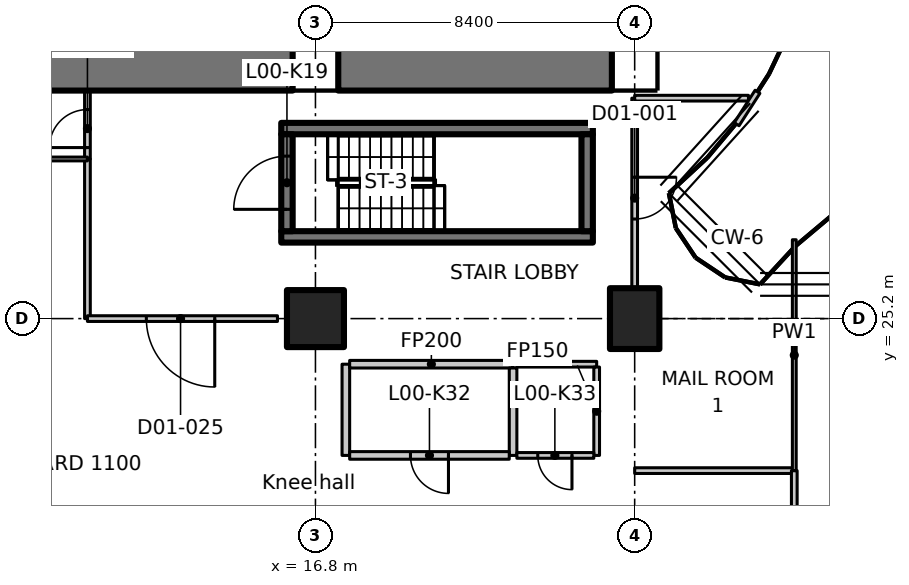
"""IFC4 building model, lengths in metres.
Left out: names, types, materials, properties, quantities, classifications, styles, units other than length and angle.
Written with IfcOpenShell. Run it as: python <this file> out.ifc"""

import sys

from ifc_helpers import new_model, si_unit, direction, frame, frame_2d, origin, origin_2d, place, context, subcontext, project, spatial, polyline, rectangle, outline, extrude, element, fill, save


model = new_model("IFC4")
c1 = context("Model", 3, precision=1e-05, world=origin(), true_north=direction((0.0, 1.0)))
c2 = subcontext(c1, "Body", "Model", "MODEL_VIEW")
j1 = project(units=[si_unit("LENGTHUNIT", "METRE"), si_unit("PLANEANGLEUNIT", "RADIAN")], contexts=[c1])
p1 = place(None, origin())
s1 = spatial("IfcSite", under=j1, at=p1, CompositionType="ELEMENT")
p2 = place(p1, origin())
s2 = spatial("IfcBuilding", under=s1, at=p2, CompositionType="ELEMENT")
p3 = place(p2, origin())
s3 = spatial("IfcBuildingStorey", under=s2, at=p3, CompositionType="ELEMENT", Elevation=0.0)
p4 = place(p3, frame((16.8, 25.2, 0.0), z_axis=(0.0, 0.0, 1.0), x_axis=(1.0, 0.0, 0.0)))
e1 = element("IfcColumn", 1, at=p4, inside=s3, PredefinedType="COLUMN", context=c2, shape_type="SweptSolid", body=[
    extrude(rectangle(XDim=1.5, YDim=1.5, at=origin_2d()), origin(), (0.0, 0.0, 1.0), 6.75),
])
p5 = place(p3, frame((25.2, 25.2, 0.0), z_axis=(0.0, 0.0, 1.0), x_axis=(1.0, 0.0, 0.0)))
e2 = element("IfcColumn", 2, at=p5, inside=s3, PredefinedType="COLUMN", context=c2, shape_type="SweptSolid", body=[
    extrude(rectangle(XDim=1.3, YDim=1.6, at=origin_2d()), origin(), (0.0, 0.0, 1.0), 6.75),
])
for number, where, z_axis, x_axis in (
    (3, (16.2, 42.0, 0.0), (1.0, 0.0, 0.0), (0.0, 1.0, 0.0)),
    (4, (24.6, 42.0, 0.0), (1.0, 0.0, 0.0), (0.0, 1.0, 0.0)),
):
    element("IfcWall", number, at=place(p3, frame(where, z_axis=z_axis, x_axis=x_axis)), inside=s3, PredefinedType="SOLIDWALL", context=c2, shape_type="SweptSolid", body=[
        extrude(outline(polyline([(-10.8, -6.3), (10.8, -6.3), (10.8, 36.25), (-10.8, 36.25), (-10.8, -6.3)]), holes=[polyline([(-8.4, 0.0), (-8.4, 26.6), (-8.36, 27.423), (-8.239, 28.239), (-8.038, 29.038), (-7.76, 29.814), (-7.408, 30.56), (-6.984, 31.267), (-6.493, 31.929), (-5.94, 32.54), (-5.329, 33.093), (-4.667, 33.584), (-3.96, 34.008), (-3.215, 34.361), (-2.438, 34.638), (-1.639, 34.839), (-0.823, 34.959), (0.0, 35.0), (0.823, 34.959), (1.639, 34.839), (2.438, 34.638), (3.215, 34.361), (3.96, 34.008), (4.667, 33.584), (5.329, 33.093), (5.94, 32.54), (6.493, 31.929), (6.984, 31.267), (7.408, 30.56), (7.76, 29.814), (8.038, 29.038), (8.239, 28.239), (8.36, 27.423), (8.4, 26.6), (8.4, 0.0), (-8.4, 0.0)])]), origin(), (0.0, 0.0, 1.0), 1.2),
    ])
p6 = place(p3, frame((9.0, 32.4, -6.3), z_axis=(0.0, 0.0, 1.0), x_axis=(1.0, 0.0, 0.0)))
e5 = element("IfcWall", 5, at=p6, inside=s3, PredefinedType="SOLIDWALL", context=c2, shape_type="SweptSolid", body=[
    extrude(rectangle(XDim=7.2, YDim=2.4, at=frame_2d((3.6, 0.0))), origin(), (0.0, 0.0, 1.0), 42.55),
])
p7 = place(p3, frame((17.4, 32.4, -6.3), z_axis=(0.0, 0.0, 1.0), x_axis=(1.0, 0.0, 0.0)))
e6 = element("IfcWall", 6, at=p7, inside=s3, PredefinedType="SOLIDWALL", context=c2, shape_type="SweptSolid", body=[
    extrude(rectangle(XDim=7.2, YDim=2.4, at=frame_2d((3.6, 0.0))), origin(), (0.0, 0.0, 1.0), 42.55),
])
p8 = place(p3, frame((25.8, 42.0, 0.0), z_axis=(1.0, 0.0, 0.0), x_axis=(0.0, 1.0, 0.0)))
e7 = element("IfcWall", 7, at=p8, inside=s3, PredefinedType="SOLIDWALL", context=c2, shape_type="SweptSolid", body=[
    extrude(outline(polyline([(5.4, 35.953), (6.0, 35.58), (6.575, 35.168), (7.121, 34.72), (7.637, 34.237), (8.12, 33.721), (8.568, 33.175), (8.98, 32.6), (9.353, 32.0), (9.686, 31.377), (9.978, 30.733), (10.227, 30.072), (10.432, 29.395), (10.593, 28.707), (10.708, 28.01), (10.777, 27.306), (10.8, 26.6), (10.8, 0.0), (8.4, 0.0), (8.4, 26.6), (8.382, 27.149), (8.328, 27.696), (8.239, 28.239), (8.114, 28.774), (7.954, 29.3), (7.76, 29.814), (7.534, 30.315), (7.275, 30.8), (6.984, 31.267), (6.664, 31.714), (6.315, 32.138), (5.94, 32.54), (5.539, 32.915), (5.114, 33.264), (4.667, 33.584), (4.2, 33.875), (3.715, 34.134), (3.215, 34.361), (2.7, 34.554), (2.174, 34.714), (1.639, 34.839), (1.096, 34.928), (0.549, 34.982), (0.0, 35.0), (-0.549, 34.982), (-1.096, 34.928), (-1.639, 34.839), (-2.174, 34.714), (-2.7, 34.554), (-3.215, 34.361), (-3.715, 34.134), (-4.2, 33.875), (-4.667, 33.584), (-5.114, 33.264), (-5.539, 32.915), (-5.94, 32.54), (-6.315, 32.138), (-6.664, 31.714), (-6.984, 31.267), (-7.275, 30.8), (-7.534, 30.315), (-7.76, 29.814), (-7.954, 29.3), (-8.114, 28.774), (-8.239, 28.239), (-8.328, 27.696), (-8.382, 27.149), (-8.4, 26.6), (-8.4, 0.0), (-10.8, 0.0), (-10.8, 26.6), (-10.777, 27.306), (-10.708, 28.01), (-10.593, 28.707), (-10.432, 29.395), (-10.227, 30.072), (-9.978, 30.733), (-9.686, 31.377), (-9.353, 32.0), (-8.98, 32.6), (-8.568, 33.175), (-8.12, 33.721), (-7.637, 34.237), (-7.121, 34.72), (-6.575, 35.168), (-6.0, 35.58), (-5.4, 35.953), (-4.844, 36.25), (4.844, 36.25), (5.4, 35.953)])), origin(), (0.0, 0.0, 1.0), 0.9),
])
for number, where, z_axis, x_axis in (
    (8, (15.9, 27.35, 0.0), (0.0, 0.0, 1.0), (1.0, 0.0, 0.0)),
    (9, (15.9, 30.2, 0.0), (0.0, 0.0, 1.0), (1.0, 0.0, 0.0)),
):
    element("IfcWall", number, at=place(p3, frame(where, z_axis=z_axis, x_axis=x_axis)), inside=s3, PredefinedType="SHEAR", context=c2, shape_type="SweptSolid", body=[
        extrude(rectangle(XDim=8.2, YDim=0.3, at=frame_2d((4.1, 0.0))), origin(), (0.0, 0.0, 1.0), 6.75),
    ])
p9 = place(p3, frame((16.05, 27.5, 0.0), z_axis=(0.0, 0.0, 1.0), x_axis=(0.0, 1.0, 0.0)))
e10 = element("IfcWall", 10, at=p9, inside=s3, PredefinedType="SHEAR", context=c2, shape_type="SweptSolid", body=[
    extrude(rectangle(XDim=2.55, YDim=0.3, at=frame_2d((1.275, 0.0))), origin(), (0.0, 0.0, 1.0), 6.75),
])
p10 = place(p9, frame((0.575, 0.0, 0.0)))
e11 = element("IfcOpeningElement", 11, at=p10, cuts=e10, PredefinedType="OPENING", context=c2, shape_type="SweptSolid", body=[
    extrude(rectangle(XDim=1.4, YDim=2.1, at=frame_2d((0.7, 1.05))), frame((0.0, 0.16, 0.0), z_axis=(0.0, -1.0, 0.0), x_axis=(1.0, 0.0, 0.0)), (0.0, 0.0, 1.0), 0.32),
])
p11 = place(p3, frame((23.95, 27.5, 0.0), z_axis=(0.0, 0.0, 1.0), x_axis=(0.0, 1.0, 0.0)))
e12 = element("IfcWall", 12, at=p11, inside=s3, PredefinedType="SHEAR", context=c2, shape_type="SweptSolid", body=[
    extrude(rectangle(XDim=2.55, YDim=0.3, at=frame_2d((1.275, 0.0))), origin(), (0.0, 0.0, 1.0), 6.75),
])
p12 = place(p3, frame((17.6, 21.6, 0.0), z_axis=(0.0, 0.0, 1.0), x_axis=(0.0, 1.0, 0.0)))
e13 = element("IfcWall", 13, at=p12, inside=s3, PredefinedType="PARTITIONING", context=c2, shape_type="SweptSolid", body=[
    extrude(rectangle(XDim=2.4, YDim=0.2, at=frame_2d((1.2, 0.0))), origin(), (0.0, 0.0, 1.0), 6.75),
])
p13 = place(p3, frame((17.7, 24.0, 0.0), z_axis=(0.0, 0.0, 1.0), x_axis=(1.0, 0.0, 0.0)))
e14 = element("IfcWall", 14, at=p13, inside=s3, PredefinedType="PARTITIONING", context=c2, shape_type="SweptSolid", body=[
    extrude(rectangle(XDim=4.3, YDim=0.2, at=frame_2d((2.15, 0.0))), origin(), (0.0, 0.0, 1.0), 6.75),
])
p14 = place(p3, frame((22.0, 23.9, 0.0), z_axis=(0.0, 0.0, 1.0), x_axis=(0.0, -1.0, 0.0)))
e15 = element("IfcWall", 15, at=p14, inside=s3, PredefinedType="PARTITIONING", context=c2, shape_type="SweptSolid", body=[
    extrude(rectangle(XDim=2.3, YDim=0.2, at=frame_2d((1.15, 0.0))), origin(), (0.0, 0.0, 1.0), 6.75),
])
p15 = place(p3, frame((21.9, 21.6, 0.0), z_axis=(0.0, 0.0, 1.0), x_axis=(-1.0, 0.0, 0.0)))
e16 = element("IfcWall", 16, at=p15, inside=s3, PredefinedType="PARTITIONING", context=c2, shape_type="SweptSolid", body=[
    extrude(rectangle(XDim=4.2, YDim=0.2, at=frame_2d((2.1, 0.0))), origin(), (0.0, 0.0, 1.0), 6.75),
])
p16 = place(p15, frame((1.6, 0.0, 0.0)))
e17 = element("IfcOpeningElement", 17, at=p16, cuts=e16, PredefinedType="OPENING", context=c2, shape_type="SweptSolid", body=[
    extrude(rectangle(XDim=1.0, YDim=2.1, at=frame_2d((0.5, 1.05))), frame((0.0, 0.11, 0.0), z_axis=(0.0, -1.0, 0.0), x_axis=(1.0, 0.0, 0.0)), (0.0, 0.0, 1.0), 0.22),
])
p17 = place(p3, frame((22.1, 24.0, 0.0), z_axis=(0.0, 0.0, 1.0), x_axis=(1.0, 0.0, 0.0)))
e18 = element("IfcWall", 18, at=p17, inside=s3, PredefinedType="PARTITIONING", context=c2, shape_type="SweptSolid", body=[
    extrude(rectangle(XDim=2.1, YDim=0.15, at=frame_2d((1.05, 0.0))), origin(), (0.0, 0.0, 1.0), 6.75),
])
p18 = place(p3, frame((24.2, 23.925, 0.0), z_axis=(0.0, 0.0, 1.0), x_axis=(0.0, -1.0, 0.0)))
e19 = element("IfcWall", 19, at=p18, inside=s3, PredefinedType="PARTITIONING", context=c2, shape_type="SweptSolid", body=[
    extrude(rectangle(XDim=2.325, YDim=0.15, at=frame_2d((1.163, 0.0))), origin(), (0.0, 0.0, 1.0), 6.75),
])
p19 = place(p3, frame((24.125, 21.6, 0.0), z_axis=(0.0, 0.0, 1.0), x_axis=(-1.0, 0.0, 0.0)))
e20 = element("IfcWall", 20, at=p19, inside=s3, PredefinedType="PARTITIONING", context=c2, shape_type="SweptSolid", body=[
    extrude(rectangle(XDim=2.025, YDim=0.15, at=frame_2d((1.012, 0.0))), origin(), (0.0, 0.0, 1.0), 6.75),
])
p20 = place(p19, frame((0.575, 0.0, 0.0)))
e21 = element("IfcOpeningElement", 21, at=p20, cuts=e20, PredefinedType="OPENING", context=c2, shape_type="SweptSolid", body=[
    extrude(rectangle(XDim=0.9, YDim=2.1, at=frame_2d((0.45, 1.05))), frame((0.0, 0.085, 0.0), z_axis=(0.0, -1.0, 0.0), x_axis=(1.0, 0.0, 0.0)), (0.0, 0.0, 1.0), 0.17),
])
p21 = place(p3, frame((25.2, 21.2, 0.0), z_axis=(0.0, 0.0, 1.0), x_axis=(1.0, 0.0, 0.0)))
e22 = element("IfcWall", 22, at=p21, inside=s3, PredefinedType="PARTITIONING", context=c2, shape_type="SweptSolid", body=[
    extrude(rectangle(XDim=4.2, YDim=0.15, at=frame_2d((2.1, 0.0))), origin(), (0.0, 0.0, 1.0), 6.73),
])
p22 = place(p3, frame((29.4, 21.2, 0.0), z_axis=(0.0, 0.0, 1.0), x_axis=(0.0, -1.0, 0.0)))
e23 = element("IfcWall", 23, at=p22, inside=s3, PredefinedType="PARTITIONING", context=c2, shape_type="SweptSolid", body=[
    extrude(rectangle(XDim=8.2, YDim=0.15, at=frame_2d((4.1, 0.0))), origin(), (0.0, 0.0, 1.0), 6.73),
])
p23 = place(p3, frame((29.4, 27.275, 0.0), z_axis=(0.0, 0.0, 1.0), x_axis=(0.0, -1.0, 0.0)))
e24 = element("IfcWall", 24, at=p23, inside=s3, PredefinedType="PARTITIONING", context=c2, shape_type="SweptSolid", body=[
    extrude(outline(polyline([(0.0, 0.0), (6.075, 0.0), (6.075, 6.73), (2.525, 6.73), (2.523, 6.38), (1.627, 6.38), (1.625, 6.73), (0.0, 6.73), (0.0, 0.0)])), frame((0.0, 0.05, 0.0), z_axis=(0.0, -1.0, 0.0), x_axis=(1.0, 0.0, 0.0)), (0.0, 0.0, 1.0), 0.1),
])
p24 = place(p3, frame((25.2, 31.0, 0.0), z_axis=(0.0, 0.0, 1.0), x_axis=(0.0, -1.0, 0.0)))
e25 = element("IfcWall", 25, at=p24, inside=s3, PredefinedType="PARTITIONING", context=c2, shape_type="SweptSolid", body=[
    extrude(rectangle(XDim=4.98, YDim=0.15, at=frame_2d((2.49, 0.0))), origin(), (0.0, 0.0, 1.0), 6.73),
])
p25 = place(p24, frame((2.08, 0.0, 0.0)))
e26 = element("IfcOpeningElement", 26, at=p25, cuts=e25, PredefinedType="OPENING", context=c2, shape_type="SweptSolid", body=[
    extrude(rectangle(XDim=1.1, YDim=2.1, at=frame_2d((0.55, 1.05))), frame((0.0, 0.085, 0.0), z_axis=(0.0, -1.0, 0.0), x_axis=(1.0, 0.0, 0.0)), (0.0, 0.0, 1.0), 0.17),
])
p26 = place(p3, frame((25.2, 31.0, 0.0), z_axis=(0.0, 0.0, 1.0), x_axis=(1.0, 0.0, 0.0)))
e27 = element("IfcWall", 27, at=p26, inside=s3, PredefinedType="PARTITIONING", context=c2, shape_type="SweptSolid", body=[
    extrude(rectangle(XDim=2.994, YDim=0.15, at=frame_2d((1.497, 0.0))), origin(), (0.0, 0.0, 1.0), 6.73),
])
p27 = place(p3, frame((28.432, 31.168, 0.0), z_axis=(0.0, 0.0, 1.0), x_axis=(-0.540854867502, -0.841115932734, 0.0)))
e28 = element("IfcWall", 28, at=p27, inside=s3, PredefinedType="PARTITIONING", context=c2, shape_type="SweptSolid", body=[
    extrude(rectangle(XDim=1.015, YDim=0.15, at=frame_2d((0.507, 0.0))), origin(), (0.0, 0.0, 1.0), 6.73),
])
p28 = place(p3, frame((10.8, 29.4, 0.0), z_axis=(0.0, 0.0, 1.0), x_axis=(0.0, 1.0, 0.0)))
e29 = element("IfcWall", 29, at=p28, inside=s3, PredefinedType="PARTITIONING", context=c2, shape_type="SweptSolid", body=[
    extrude(rectangle(XDim=1.8, YDim=0.15, at=frame_2d((0.9, 0.0))), origin(), (0.0, 0.0, 1.0), 6.73),
])
p29 = place(p28, frame((0.3, 0.0, 0.0)))
e30 = element("IfcOpeningElement", 30, at=p29, cuts=e29, PredefinedType="OPENING", context=c2, shape_type="SweptSolid", body=[
    extrude(rectangle(XDim=1.0, YDim=2.1, at=frame_2d((0.5, 1.05))), frame((0.0, 0.085, 0.0), z_axis=(0.0, -1.0, 0.0), x_axis=(1.0, 0.0, 0.0)), (0.0, 0.0, 1.0), 0.17),
])
p30 = place(p3, frame((10.8, 25.2, 0.0), z_axis=(0.0, 0.0, 1.0), x_axis=(0.0, 1.0, 0.0)))
e31 = element("IfcWall", 31, at=p30, inside=s3, PredefinedType="PARTITIONING", context=c2, shape_type="SweptSolid", body=[
    extrude(rectangle(XDim=4.2, YDim=0.15, at=frame_2d((2.1, 0.0))), origin(), (0.0, 0.0, 1.0), 6.73),
])
p31 = place(p3, frame((10.8, 29.4, 0.0), z_axis=(0.0, 0.0, 1.0), x_axis=(-1.0, 0.0, 0.0)))
e32 = element("IfcWall", 32, at=p31, inside=s3, PredefinedType="PARTITIONING", context=c2, shape_type="SweptSolid", body=[
    extrude(rectangle(XDim=3.6, YDim=0.1, at=frame_2d((1.8, 0.0))), origin(), (0.0, 0.0, 1.0), 6.73),
])
p32 = place(p3, frame((15.8, 25.2, 0.0), z_axis=(0.0, 0.0, 1.0), x_axis=(-1.0, 0.0, 0.0)))
e33 = element("IfcWall", 33, at=p32, inside=s3, PredefinedType="PARTITIONING", context=c2, shape_type="SweptSolid", body=[
    extrude(rectangle(XDim=5.0, YDim=0.15, at=frame_2d((2.5, 0.0))), origin(), (0.0, 0.0, 1.0), 6.73),
])
p33 = place(p32, frame((1.65, 0.0, 0.0)))
e34 = element("IfcOpeningElement", 34, at=p33, cuts=e33, PredefinedType="OPENING", context=c2, shape_type="SweptSolid", body=[
    extrude(rectangle(XDim=1.8, YDim=2.1, at=frame_2d((0.9, 1.05))), frame((0.0, 0.085, 0.0), z_axis=(0.0, -1.0, 0.0), x_axis=(1.0, 0.0, 0.0)), (0.0, 0.0, 1.0), 0.17),
])
p34 = place(p10, origin())
e35 = element("IfcDoor", 35, at=p34, inside=s3, OperationType="SINGLE_SWING_RIGHT", PredefinedType="DOOR", context=c2, shape_type="SweptSolid", body=[
    extrude(rectangle(XDim=1.4, YDim=2.1, at=frame_2d((0.7, 1.05))), frame((0.0, 0.025, 0.0), z_axis=(0.0, -1.0, 0.0), x_axis=(1.0, 0.0, 0.0)), (0.0, 0.0, 1.0), 0.05),
])
fill(e11, e35)
p35 = place(p16, origin())
e36 = element("IfcDoor", 36, at=p35, inside=s3, OperationType="SINGLE_SWING_LEFT", PredefinedType="DOOR", context=c2, shape_type="SweptSolid", body=[
    extrude(rectangle(XDim=1.0, YDim=2.1, at=frame_2d((0.5, 1.05))), frame((0.0, 0.025, 0.0), z_axis=(0.0, -1.0, 0.0), x_axis=(1.0, 0.0, 0.0)), (0.0, 0.0, 1.0), 0.05),
])
fill(e17, e36)
p36 = place(p20, origin())
e37 = element("IfcDoor", 37, at=p36, inside=s3, OperationType="SINGLE_SWING_RIGHT", PredefinedType="DOOR", context=c2, shape_type="SweptSolid", body=[
    extrude(rectangle(XDim=0.9, YDim=2.1, at=frame_2d((0.45, 1.05))), frame((0.0, 0.025, 0.0), z_axis=(0.0, -1.0, 0.0), x_axis=(1.0, 0.0, 0.0)), (0.0, 0.0, 1.0), 0.05),
])
fill(e21, e37)
p37 = place(p25, origin())
e38 = element("IfcDoor", 38, at=p37, inside=s3, OperationType="SINGLE_SWING_RIGHT", PredefinedType="DOOR", context=c2, shape_type="SweptSolid", body=[
    extrude(rectangle(XDim=1.1, YDim=2.1, at=frame_2d((0.55, 1.05))), frame((0.0, 0.025, 0.0), z_axis=(0.0, -1.0, 0.0), x_axis=(1.0, 0.0, 0.0)), (0.0, 0.0, 1.0), 0.05),
])
fill(e26, e38)
p38 = place(p29, origin())
e39 = element("IfcDoor", 39, at=p38, inside=s3, OperationType="SINGLE_SWING_LEFT", PredefinedType="DOOR", context=c2, shape_type="SweptSolid", body=[
    extrude(rectangle(XDim=1.0, YDim=2.1, at=frame_2d((0.5, 1.05))), frame((0.0, 0.025, 0.0), z_axis=(0.0, -1.0, 0.0), x_axis=(1.0, 0.0, 0.0)), (0.0, 0.0, 1.0), 0.05),
])
fill(e30, e39)
p39 = place(p33, origin())
e40 = element("IfcDoor", 40, at=p39, inside=s3, OperationType="DOUBLE_DOOR_SINGLE_SWING", PredefinedType="DOOR", context=c2, shape_type="SweptSolid", body=[
    extrude(rectangle(XDim=1.8, YDim=2.1, at=frame_2d((0.9, 1.05))), frame((0.0, 0.025, 0.0), z_axis=(0.0, -1.0, 0.0), x_axis=(1.0, 0.0, 0.0)), (0.0, 0.0, 1.0), 0.05),
])
fill(e34, e40)
save(model, sys.argv[1])
